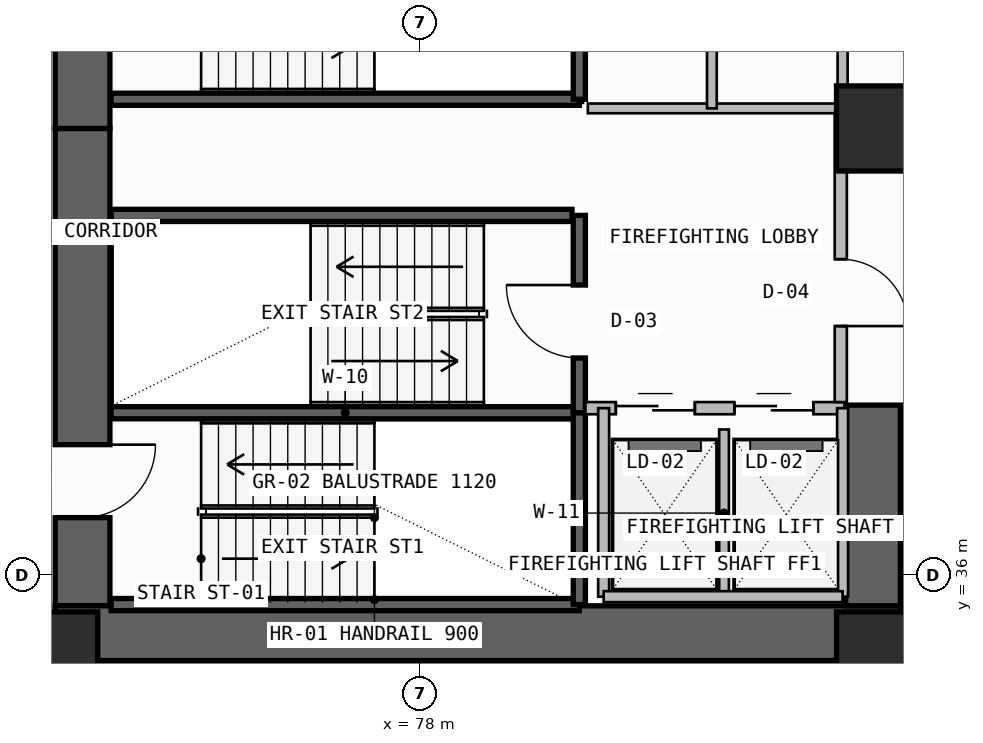
"""IFC4 building model, lengths in metres.
Left out: names, types, materials, properties, quantities, classifications, styles, units other than length and angle.
Written with IfcOpenShell. Run it as: python <this file> out.ifc"""

import sys

from ifc_helpers import new_model, si_unit, direction, frame, frame_2d, origin, origin_2d, place, context, subcontext, project, spatial, rectangle, extrude, element, fill, save


model = new_model("IFC4")
c1 = context("Model", 3, precision=1e-05, world=origin(), true_north=direction((0.0, 1.0)))
c2 = subcontext(c1, "Body", "Model", "MODEL_VIEW")
j1 = project(units=[si_unit("LENGTHUNIT", "METRE"), si_unit("PLANEANGLEUNIT", "RADIAN")], contexts=[c1])
p1 = place(None, origin())
s1 = spatial("IfcSite", under=j1, at=p1, CompositionType="ELEMENT")
p2 = place(p1, origin())
s2 = spatial("IfcBuilding", under=s1, at=p2, CompositionType="ELEMENT")
p3 = place(p2, frame((0.0, 0.0, 153.9)))
s3 = spatial("IfcBuildingStorey", under=s2, at=p3, CompositionType="ELEMENT", Elevation=153.9)
p4 = place(p3, frame((72.45, 35.5, -0.26), z_axis=(0.0, 0.0, 1.0), x_axis=(0.0, 1.0, 0.0)))
e1 = element("IfcWall", 1, at=p4, inside=s3, PredefinedType="SHEAR", context=c2, shape_type="SweptSolid", body=[
    extrude(rectangle(XDim=7.85, YDim=0.9, at=frame_2d((3.925, 0.0))), origin(), (0.0, 0.0, 1.0), 3.6),
])
p5 = place(p4, frame((1.45, 0.0, 0.26)))
e2 = element("IfcOpeningElement", 2, at=p5, cuts=e1, PredefinedType="OPENING", context=c2, shape_type="SweptSolid", body=[
    extrude(rectangle(XDim=1.2, YDim=2.2, at=frame_2d((0.6, 1.1))), frame((0.0, 0.46, 0.0), z_axis=(0.0, -1.0, 0.0), x_axis=(1.0, 0.0, 0.0)), (0.0, 0.0, 1.0), 0.92),
])
p6 = place(p3, frame((72.0, 35.05, -0.26), z_axis=(0.0, 0.0, 1.0), x_axis=(1.0, 0.0, 0.0)))
e3 = element("IfcWall", 3, at=p6, inside=s3, PredefinedType="SHEAR", context=c2, shape_type="SweptSolid", body=[
    extrude(rectangle(XDim=13.9, YDim=0.9, at=frame_2d((6.95, 0.0))), origin(), (0.0, 0.0, 1.0), 3.6),
])
p7 = place(p3, frame((85.45, 35.5, -0.26), z_axis=(0.0, 0.0, 1.0), x_axis=(0.0, 1.0, 0.0)))
e4 = element("IfcWall", 4, at=p7, inside=s3, PredefinedType="SHEAR", context=c2, shape_type="SweptSolid", body=[
    extrude(rectangle(XDim=3.3, YDim=0.9, at=frame_2d((1.65, 0.0))), origin(), (0.0, 0.0, 1.0), 3.6),
])
p8 = place(p3, frame((72.45, 43.35, -0.26), z_axis=(0.0, 0.0, 1.0), x_axis=(0.0, 1.0, 0.0)))
e5 = element("IfcWall", 5, at=p8, inside=s3, PredefinedType="SHEAR", context=c2, shape_type="SweptSolid", body=[
    extrude(rectangle(XDim=12.7, YDim=0.9, at=frame_2d((6.35, 0.0))), origin(), (0.0, 0.0, 1.0), 3.6),
])
p9 = place(p8, frame((1.35, 0.0, 0.26)))
e6 = element("IfcOpeningElement", 6, at=p9, cuts=e5, PredefinedType="OPENING", context=c2, shape_type="SweptSolid", body=[
    extrude(rectangle(XDim=1.2, YDim=2.2, at=frame_2d((0.6, 1.1))), frame((0.0, 0.46, 0.0), z_axis=(0.0, -1.0, 0.0), x_axis=(1.0, 0.0, 0.0)), (0.0, 0.0, 1.0), 0.92),
])
for number, where, z_axis, x_axis in (
    (7, (72.0, 34.7, 0.0), (0.0, 0.0, 1.0), (1.0, 0.0, 0.0)),
    (8, (85.55, 34.7, 0.0), (0.0, 0.0, 1.0), (1.0, 0.0, 0.0)),
    (9, (85.55, 43.35, 0.0), (0.0, 0.0, 1.0), (1.0, 0.0, 0.0)),
):
    element("IfcColumn", number, at=place(p3, frame(where, z_axis=z_axis, x_axis=x_axis)), inside=s3, PredefinedType="COLUMN", context=c2, shape_type="SweptSolid", body=[
        extrude(rectangle(XDim=1.4, YDim=1.4, at=origin_2d()), origin(), (0.0, 0.0, 1.0), 3.6),
    ])
for number, where, z_axis, x_axis in (
    (10, (72.92, 35.52, -0.26), (0.0, 0.0, 1.0), (1.0, 0.0, 0.0)),
    (11, (72.92, 38.675, -0.26), (0.0, 0.0, 1.0), (1.0, 0.0, 0.0)),
):
    element("IfcWall", number, at=place(p3, frame(where, z_axis=z_axis, x_axis=x_axis)), inside=s3, PredefinedType="SOLIDWALL", context=c2, shape_type="SweptSolid", body=[
        extrude(rectangle(XDim=7.7, YDim=0.2, at=frame_2d((3.85, 0.0))), origin(), (0.0, 0.0, 1.0), 3.6),
    ])
p10 = place(p3, frame((80.62, 35.52, -0.26), z_axis=(0.0, 0.0, 1.0), x_axis=(0.0, 1.0, 0.0)))
e12 = element("IfcWall", 12, at=p10, inside=s3, PredefinedType="SOLIDWALL", context=c2, shape_type="SweptSolid", body=[
    extrude(rectangle(XDim=3.155, YDim=0.2, at=frame_2d((1.578, 0.0))), origin(), (0.0, 0.0, 1.0), 3.6),
])
p11 = place(p3, frame((80.62, 38.675, -0.26), z_axis=(0.0, 0.0, 1.0), x_axis=(0.0, 1.0, 0.0)))
e13 = element("IfcWall", 13, at=p11, inside=s3, PredefinedType="SOLIDWALL", context=c2, shape_type="SweptSolid", body=[
    extrude(rectangle(XDim=3.245, YDim=0.2, at=frame_2d((1.623, 0.0))), origin(), (0.0, 0.0, 1.0), 3.6),
])
p12 = place(p11, frame((0.9, 0.0, 0.26)))
e14 = element("IfcOpeningElement", 14, at=p12, cuts=e13, PredefinedType="OPENING", context=c2, shape_type="SweptSolid", body=[
    extrude(rectangle(XDim=1.2, YDim=2.2, at=frame_2d((0.6, 1.1))), frame((0.0, 0.11, 0.0), z_axis=(0.0, -1.0, 0.0), x_axis=(1.0, 0.0, 0.0)), (0.0, 0.0, 1.0), 0.22),
])
p13 = place(p3, frame((80.72, 38.75, 0.0), z_axis=(0.0, 0.0, 1.0), x_axis=(1.0, 0.0, 0.0)))
e15 = element("IfcWall", 15, at=p13, inside=s3, PredefinedType="SOLIDWALL", context=c2, shape_type="SweptSolid", body=[
    extrude(rectangle(XDim=4.26, YDim=0.2, at=frame_2d((2.13, 0.0))), origin(), (0.0, 0.0, 1.0), 3.34),
])
p14 = place(p13, frame((0.5, 0.0, 0.0)))
e16 = element("IfcOpeningElement", 16, at=p14, cuts=e15, PredefinedType="OPENING", context=c2, shape_type="SweptSolid", body=[
    extrude(rectangle(XDim=1.3, YDim=2.3, at=frame_2d((0.65, 1.15))), frame((0.0, 0.11, 0.0), z_axis=(0.0, -1.0, 0.0), x_axis=(1.0, 0.0, 0.0)), (0.0, 0.0, 1.0), 0.22),
])
p15 = place(p13, frame((2.45, 0.0, 0.0)))
e17 = element("IfcOpeningElement", 17, at=p15, cuts=e15, PredefinedType="OPENING", context=c2, shape_type="SweptSolid", body=[
    extrude(rectangle(XDim=1.3, YDim=2.3, at=frame_2d((0.65, 1.15))), frame((0.0, 0.11, 0.0), z_axis=(0.0, -1.0, 0.0), x_axis=(1.0, 0.0, 0.0)), (0.0, 0.0, 1.0), 0.22),
])
p16 = place(p3, frame((83.0, 35.65, 0.0), z_axis=(0.0, 0.0, 1.0), x_axis=(0.0, 1.0, 0.0)))
e18 = element("IfcWall", 18, at=p16, inside=s3, PredefinedType="PLUMBINGWALL", context=c2, shape_type="SweptSolid", body=[
    extrude(rectangle(XDim=2.75, YDim=0.16, at=frame_2d((1.375, 0.0))), origin(), (0.0, 0.0, 1.0), 3.34),
])
for number, where, z_axis, x_axis in (
    (19, (84.95, 35.65, 0.0), (0.0, 0.0, 1.0), (0.0, 1.0, 0.0)),
    (20, (81.02, 35.65, 0.0), (0.0, 0.0, 1.0), (0.0, 1.0, 0.0)),
):
    element("IfcWall", number, at=place(p3, frame(where, z_axis=z_axis, x_axis=x_axis)), inside=s3, PredefinedType="SOLIDWALL", context=c2, shape_type="SweptSolid", body=[
        extrude(rectangle(XDim=3.1, YDim=0.18, at=frame_2d((1.55, 0.0))), origin(), (0.0, 0.0, 1.0), 3.34),
    ])
p17 = place(p3, frame((81.02, 35.65, 0.0), z_axis=(0.0, 0.0, 1.0), x_axis=(1.0, 0.0, 0.0)))
e21 = element("IfcWall", 21, at=p17, inside=s3, PredefinedType="SOLIDWALL", context=c2, shape_type="SweptSolid", body=[
    extrude(rectangle(XDim=3.93, YDim=0.18, at=frame_2d((1.965, 0.0))), origin(), (0.0, 0.0, 1.0), 3.34),
])
p18 = place(p3, frame((84.92, 38.85, 0.0), z_axis=(0.0, 0.0, 1.0), x_axis=(0.0, 1.0, 0.0)))
e22 = element("IfcWall", 22, at=p18, inside=s3, PredefinedType="SOLIDWALL", context=c2, shape_type="SweptSolid", body=[
    extrude(rectangle(XDim=4.83, YDim=0.2, at=frame_2d((2.415, 0.0))), origin(), (0.0, 0.0, 1.0), 3.34),
])
p19 = place(p18, frame((1.25, 0.0, 0.0)))
e23 = element("IfcOpeningElement", 23, at=p19, cuts=e22, PredefinedType="OPENING", context=c2, shape_type="SweptSolid", body=[
    extrude(rectangle(XDim=1.1, YDim=2.2, at=frame_2d((0.55, 1.1))), frame((0.0, 0.11, 0.0), z_axis=(0.0, -1.0, 0.0), x_axis=(1.0, 0.0, 0.0)), (0.0, 0.0, 1.0), 0.22),
])
p20 = place(p3, frame((72.92, 41.92, -0.26), z_axis=(0.0, 0.0, 1.0), x_axis=(1.0, 0.0, 0.0)))
e24 = element("IfcWall", 24, at=p20, inside=s3, PredefinedType="SOLIDWALL", context=c2, shape_type="SweptSolid", body=[
    extrude(rectangle(XDim=7.58, YDim=0.2, at=frame_2d((3.79, 0.0))), origin(), (0.0, 0.0, 1.0), 3.6),
])
p21 = place(p3, frame((72.92, 43.83, -0.26), z_axis=(0.0, 0.0, 1.0), x_axis=(1.0, 0.0, 0.0)))
e25 = element("IfcWall", 25, at=p21, inside=s3, PredefinedType="SOLIDWALL", context=c2, shape_type="SweptSolid", body=[
    extrude(rectangle(XDim=7.7, YDim=0.2, at=frame_2d((3.85, 0.0))), origin(), (0.0, 0.0, 1.0), 3.6),
])
p22 = place(p3, frame((80.62, 43.83, -0.26), z_axis=(0.0, 0.0, 1.0), x_axis=(0.0, 1.0, 0.0)))
e26 = element("IfcWall", 26, at=p22, inside=s3, PredefinedType="SOLIDWALL", context=c2, shape_type="SweptSolid", body=[
    extrude(rectangle(XDim=3.24, YDim=0.2, at=frame_2d((1.62, 0.0))), origin(), (0.0, 0.0, 1.0), 3.6),
])
p23 = place(p3, frame((84.95, 43.68, 0.0), z_axis=(0.0, 0.0, 1.0), x_axis=(0.0, 1.0, 0.0)))
e27 = element("IfcWall", 27, at=p23, inside=s3, PredefinedType="PLUMBINGWALL", context=c2, shape_type="SweptSolid", body=[
    extrude(rectangle(XDim=1.9, YDim=0.165, at=frame_2d((0.95, 0.0))), origin(), (0.0, 0.0, 1.0), 3.34),
])
p24 = place(p3, frame((80.76, 43.68, 0.0), z_axis=(0.0, 0.0, 1.0), x_axis=(1.0, 0.0, 0.0)))
e28 = element("IfcWall", 28, at=p24, inside=s3, PredefinedType="PLUMBINGWALL", context=c2, shape_type="SweptSolid", body=[
    extrude(rectangle(XDim=4.19, YDim=0.16, at=frame_2d((2.095, 0.0))), origin(), (0.0, 0.0, 1.0), 3.34),
])
p25 = place(p3, frame((82.8, 43.68, 0.0), z_axis=(0.0, 0.0, 1.0), x_axis=(0.0, 1.0, 0.0)))
e29 = element("IfcWall", 29, at=p25, inside=s3, PredefinedType="PLUMBINGWALL", context=c2, shape_type="SweptSolid", body=[
    extrude(rectangle(XDim=1.9, YDim=0.16, at=frame_2d((0.95, 0.0))), origin(), (0.0, 0.0, 1.0), 3.34),
])
p26 = place(p5, frame((1.2, 0.0, 0.0), z_axis=(0.0, 0.0, 1.0), x_axis=(-1.0, 0.0, 0.0)))
e30 = element("IfcDoor", 30, at=p26, inside=s3, OperationType="SINGLE_SWING_LEFT", PredefinedType="USERDEFINED", context=c2, shape_type="SweptSolid", body=[
    extrude(rectangle(XDim=1.2, YDim=2.2, at=frame_2d((0.6, 1.1))), frame((0.0, 0.025, 0.0), z_axis=(0.0, -1.0, 0.0), x_axis=(1.0, 0.0, 0.0)), (0.0, 0.0, 1.0), 0.05),
])
fill(e2, e30)
p27 = place(p12, origin())
e31 = element("IfcDoor", 31, at=p27, inside=s3, OperationType="SINGLE_SWING_RIGHT", PredefinedType="USERDEFINED", context=c2, shape_type="SweptSolid", body=[
    extrude(rectangle(XDim=1.2, YDim=2.2, at=frame_2d((0.6, 1.1))), frame((0.0, 0.025, 0.0), z_axis=(0.0, -1.0, 0.0), x_axis=(1.0, 0.0, 0.0)), (0.0, 0.0, 1.0), 0.05),
])
fill(e14, e31)
p28 = place(p14, origin())
e32 = element("IfcDoor", 32, at=p28, inside=s3, OperationType="DOUBLE_DOOR_SLIDING", PredefinedType="DOOR", context=c2, shape_type="SweptSolid", body=[
    extrude(rectangle(XDim=1.3, YDim=2.3, at=frame_2d((0.65, 1.15))), frame((0.0, 0.025, 0.0), z_axis=(0.0, -1.0, 0.0), x_axis=(1.0, 0.0, 0.0)), (0.0, 0.0, 1.0), 0.05),
])
fill(e16, e32)
p29 = place(p15, origin())
e33 = element("IfcDoor", 33, at=p29, inside=s3, OperationType="DOUBLE_DOOR_SLIDING", PredefinedType="DOOR", context=c2, shape_type="SweptSolid", body=[
    extrude(rectangle(XDim=1.3, YDim=2.3, at=frame_2d((0.65, 1.15))), frame((0.0, 0.025, 0.0), z_axis=(0.0, -1.0, 0.0), x_axis=(1.0, 0.0, 0.0)), (0.0, 0.0, 1.0), 0.05),
])
fill(e17, e33)
p30 = place(p19, frame((1.1, 0.0, 0.0), z_axis=(0.0, 0.0, 1.0), x_axis=(-1.0, 0.0, 0.0)))
e34 = element("IfcDoor", 34, at=p30, inside=s3, OperationType="SINGLE_SWING_RIGHT", PredefinedType="DOOR", context=c2, shape_type="SweptSolid", body=[
    extrude(rectangle(XDim=1.1, YDim=2.2, at=frame_2d((0.55, 1.1))), frame((0.0, 0.025, 0.0), z_axis=(0.0, -1.0, 0.0), x_axis=(1.0, 0.0, 0.0)), (0.0, 0.0, 1.0), 0.05),
])
fill(e23, e34)
save(model, sys.argv[1])
